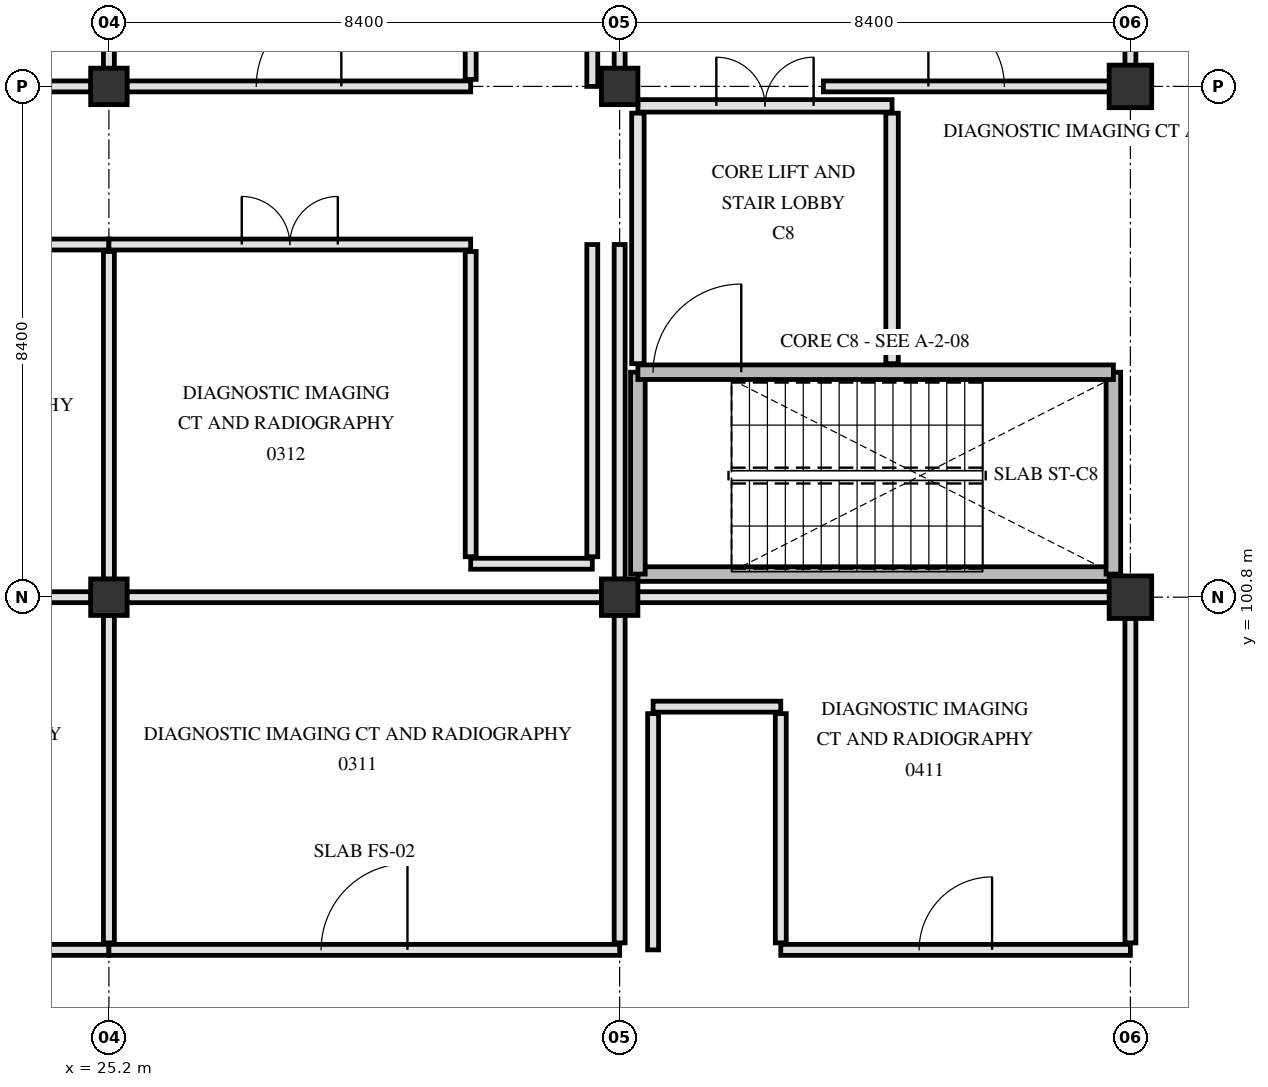
"""IFC4 building model, lengths in metres.
Left out: names, types, materials, properties, quantities, classifications, styles, units other than length and angle.
Written with IfcOpenShell. Run it as: python <this file> out.ifc"""

import sys

from ifc_helpers import new_model, si_unit, direction, frame, frame_2d, origin, origin_2d, place, context, subcontext, project, spatial, rectangle, extrude, element, fill, save


model = new_model("IFC4")
c1 = context("Model", 3, precision=1e-05, world=origin(), true_north=direction((0.0, 1.0)))
c2 = subcontext(c1, "Body", "Model", "MODEL_VIEW")
j1 = project(units=[si_unit("LENGTHUNIT", "METRE"), si_unit("PLANEANGLEUNIT", "RADIAN")], contexts=[c1])
p1 = place(None, origin())
s1 = spatial("IfcSite", under=j1, at=p1, CompositionType="ELEMENT")
p2 = place(p1, origin())
s2 = spatial("IfcBuilding", under=s1, at=p2, CompositionType="ELEMENT")
p3 = place(p2, origin())
s3 = spatial("IfcBuildingStorey", under=s2, at=p3, CompositionType="ELEMENT", Elevation=0.0)
for number, where, z_axis, x_axis in (
    (1, (25.2, 100.8, 0.0), (0.0, 0.0, 1.0), (1.0, 0.0, 0.0)),
    (2, (25.2, 109.2, 0.0), (0.0, 0.0, 1.0), (1.0, 0.0, 0.0)),
    (3, (33.6, 100.8, 0.0), (0.0, 0.0, 1.0), (1.0, 0.0, 0.0)),
    (4, (33.6, 109.2, 0.0), (0.0, 0.0, 1.0), (1.0, 0.0, 0.0)),
):
    element("IfcColumn", number, at=place(p3, frame(where, z_axis=z_axis, x_axis=x_axis)), inside=s3, PredefinedType="COLUMN", context=c2, shape_type="SweptSolid", body=[
        extrude(rectangle(XDim=0.6, YDim=0.6, at=origin_2d()), origin(), (0.0, 0.0, 1.0), 4.8),
    ])
for number, where, z_axis, x_axis in (
    (5, (42.0, 100.8, 0.0), (0.0, 0.0, 1.0), (1.0, 0.0, 0.0)),
    (6, (42.0, 109.2, 0.0), (0.0, 0.0, 1.0), (1.0, 0.0, 0.0)),
):
    element("IfcColumn", number, at=place(p3, frame(where, z_axis=z_axis, x_axis=x_axis)), inside=s3, PredefinedType="COLUMN", context=c2, shape_type="SweptSolid", body=[
        extrude(rectangle(XDim=0.7, YDim=0.7, at=origin_2d()), origin(), (0.0, 0.0, 1.0), 4.8),
    ])
p4 = place(p3, frame((33.9, 101.18, 0.0), z_axis=(0.0, 0.0, 1.0), x_axis=(1.0, 0.0, 0.0)))
e7 = element("IfcWall", 7, at=p4, inside=s3, PredefinedType="SHEAR", context=c2, shape_type="SweptSolid", body=[
    extrude(rectangle(XDim=7.82, YDim=0.24, at=frame_2d((3.91, 0.0))), origin(), (0.0, 0.0, 1.0), 4.5),
])
for number, where, z_axis, x_axis in (
    (8, (33.9, 101.18, 0.0), (0.0, 0.0, 1.0), (0.0, 1.0, 0.0)),
    (9, (41.72, 101.18, 0.0), (0.0, 0.0, 1.0), (0.0, 1.0, 0.0)),
):
    element("IfcWall", number, at=place(p3, frame(where, z_axis=z_axis, x_axis=x_axis)), inside=s3, PredefinedType="SHEAR", context=c2, shape_type="SweptSolid", body=[
        extrude(rectangle(XDim=3.32, YDim=0.24, at=frame_2d((1.66, 0.0))), origin(), (0.0, 0.0, 1.0), 4.5),
    ])
p5 = place(p3, frame((33.9, 104.5, 0.0), z_axis=(0.0, 0.0, 1.0), x_axis=(1.0, 0.0, 0.0)))
e10 = element("IfcWall", 10, at=p5, inside=s3, PredefinedType="SHEAR", context=c2, shape_type="SweptSolid", body=[
    extrude(rectangle(XDim=7.82, YDim=0.24, at=frame_2d((3.91, 0.0))), origin(), (0.0, 0.0, 1.0), 4.5),
])
p6 = place(p5, frame((0.25, 0.0, 0.0)))
e11 = element("IfcOpeningElement", 11, at=p6, cuts=e10, PredefinedType="OPENING", context=c2, shape_type="SweptSolid", body=[
    extrude(rectangle(XDim=1.45, YDim=2.2, at=frame_2d((0.725, 1.1))), frame((0.0, 0.13, 0.0), z_axis=(0.0, -1.0, 0.0), x_axis=(1.0, 0.0, 0.0)), (0.0, 0.0, 1.0), 0.26),
])
p7 = place(p3, frame((38.08, 104.64, 0.0), z_axis=(0.0, 0.0, 1.0), x_axis=(0.0, 1.0, 0.0)))
e12 = element("IfcWall", 12, at=p7, inside=s3, PredefinedType="PARTITIONING", context=c2, shape_type="SweptSolid", body=[
    extrude(rectangle(XDim=4.12, YDim=0.205, at=frame_2d((2.06, 0.0))), origin(), (0.0, 0.0, 1.0), 4.49),
])
p8 = place(p3, frame((33.9, 104.64, 0.0), z_axis=(0.0, 0.0, 1.0), x_axis=(0.0, 1.0, 0.0)))
e13 = element("IfcWall", 13, at=p8, inside=s3, PredefinedType="PARTITIONING", context=c2, shape_type="SweptSolid", body=[
    extrude(rectangle(XDim=4.12, YDim=0.205, at=frame_2d((2.06, 0.0))), origin(), (0.0, 0.0, 1.0), 3.89),
])
p9 = place(p3, frame((33.9, 108.88, 0.0), z_axis=(0.0, 0.0, 1.0), x_axis=(1.0, 0.0, 0.0)))
e14 = element("IfcWall", 14, at=p9, inside=s3, PredefinedType="PARTITIONING", context=c2, shape_type="SweptSolid", body=[
    extrude(rectangle(XDim=4.18, YDim=0.205, at=frame_2d((2.09, 0.0))), origin(), (0.0, 0.0, 1.0), 3.84),
])
p10 = place(p9, frame((1.29, 0.0, 0.0)))
e15 = element("IfcOpeningElement", 15, at=p10, cuts=e14, PredefinedType="OPENING", context=c2, shape_type="SweptSolid", body=[
    extrude(rectangle(XDim=1.6, YDim=2.25, at=frame_2d((0.8, 1.125))), frame((0.0, 0.113, 0.0), z_axis=(0.0, -1.0, 0.0), x_axis=(1.0, 0.0, 0.0)), (0.0, 0.0, 1.0), 0.225),
])
p11 = place(p3, frame((16.8, 95.0, 0.0), z_axis=(0.0, 0.0, 1.0), x_axis=(1.0, 0.0, 0.0)))
e16 = element("IfcWall", 16, at=p11, inside=s3, PredefinedType="PARTITIONING", context=c2, shape_type="SweptSolid", body=[
    extrude(rectangle(XDim=8.4, YDim=0.18, at=frame_2d((4.2, 0.0))), origin(), (0.0, 0.0, 1.0), 3.89),
])
p12 = place(p11, frame((3.38, 0.0, 0.0)))
e17 = element("IfcOpeningElement", 17, at=p12, cuts=e16, PredefinedType="OPENING", context=c2, shape_type="SweptSolid", body=[
    extrude(rectangle(XDim=1.64, YDim=2.28, at=frame_2d((0.82, 1.14))), frame((0.0, 0.1, 0.0), z_axis=(0.0, -1.0, 0.0), x_axis=(1.0, 0.0, 0.0)), (0.0, 0.0, 1.0), 0.2),
])
p13 = place(p3, frame((25.2, 95.0, 0.0), z_axis=(0.0, 0.0, 1.0), x_axis=(1.0, 0.0, 0.0)))
e18 = element("IfcWall", 18, at=p13, inside=s3, PredefinedType="PARTITIONING", context=c2, shape_type="SweptSolid", body=[
    extrude(rectangle(XDim=8.4, YDim=0.18, at=frame_2d((4.2, 0.0))), origin(), (0.0, 0.0, 1.0), 3.89),
])
p14 = place(p13, frame((3.49, 0.0, 0.0)))
e19 = element("IfcOpeningElement", 19, at=p14, cuts=e18, PredefinedType="OPENING", context=c2, shape_type="SweptSolid", body=[
    extrude(rectangle(XDim=1.42, YDim=2.22, at=frame_2d((0.71, 1.11))), frame((0.0, 0.1, 0.0), z_axis=(0.0, -1.0, 0.0), x_axis=(1.0, 0.0, 0.0)), (0.0, 0.0, 1.0), 0.2),
])
p15 = place(p3, frame((36.25, 95.0, 0.0), z_axis=(0.0, 0.0, 1.0), x_axis=(1.0, 0.0, 0.0)))
e20 = element("IfcWall", 20, at=p15, inside=s3, PredefinedType="PARTITIONING", context=c2, shape_type="SweptSolid", body=[
    extrude(rectangle(XDim=5.75, YDim=0.18, at=frame_2d((2.875, 0.0))), origin(), (0.0, 0.0, 1.0), 3.89),
])
p16 = place(p15, frame((2.275, 0.0, 0.0)))
e21 = element("IfcOpeningElement", 21, at=p16, cuts=e20, PredefinedType="OPENING", context=c2, shape_type="SweptSolid", body=[
    extrude(rectangle(XDim=1.2, YDim=2.15, at=frame_2d((0.6, 1.075))), frame((0.0, 0.1, 0.0), z_axis=(0.0, -1.0, 0.0), x_axis=(1.0, 0.0, 0.0)), (0.0, 0.0, 1.0), 0.2),
])
p17 = place(p3, frame((34.15, 99.0, 0.0), z_axis=(0.0, 0.0, 1.0), x_axis=(1.0, 0.0, 0.0)))
e22 = element("IfcWall", 22, at=p17, inside=s3, PredefinedType="PARTITIONING", context=c2, shape_type="SweptSolid", body=[
    extrude(rectangle(XDim=2.1, YDim=0.18, at=frame_2d((1.05, 0.0))), origin(), (0.0, 0.0, 1.0), 4.49),
])
p18 = place(p3, frame((17.095, 100.8, 0.0), z_axis=(0.0, 0.0, 1.0), x_axis=(1.0, 0.0, 0.0)))
e23 = element("IfcWall", 23, at=p18, inside=s3, PredefinedType="PARTITIONING", context=c2, shape_type="SweptSolid", body=[
    extrude(rectangle(XDim=7.81, YDim=0.18, at=frame_2d((3.905, 0.0))), origin(), (0.0, 0.0, 1.0), 3.84),
])
p19 = place(p3, frame((25.495, 100.8, 0.0), z_axis=(0.0, 0.0, 1.0), x_axis=(1.0, 0.0, 0.0)))
e24 = element("IfcWall", 24, at=p19, inside=s3, PredefinedType="PARTITIONING", context=c2, shape_type="SweptSolid", body=[
    extrude(rectangle(XDim=7.81, YDim=0.18, at=frame_2d((3.905, 0.0))), origin(), (0.0, 0.0, 1.0), 3.84),
])
p20 = place(p3, frame((33.895, 100.8, 0.0), z_axis=(0.0, 0.0, 1.0), x_axis=(1.0, 0.0, 0.0)))
e25 = element("IfcWall", 25, at=p20, inside=s3, PredefinedType="PARTITIONING", context=c2, shape_type="SweptSolid", body=[
    extrude(rectangle(XDim=7.76, YDim=0.18, at=frame_2d((3.88, 0.0))), origin(), (0.0, 0.0, 1.0), 3.84),
])
p21 = place(p3, frame((31.15, 101.35, 0.0), z_axis=(0.0, 0.0, 1.0), x_axis=(1.0, 0.0, 0.0)))
e26 = element("IfcWall", 26, at=p21, inside=s3, PredefinedType="PARTITIONING", context=c2, shape_type="SweptSolid", body=[
    extrude(rectangle(XDim=2.0, YDim=0.18, at=frame_2d((1.0, 0.0))), origin(), (0.0, 0.0, 1.0), 4.49),
])
p22 = place(p3, frame((16.8, 106.6, 0.0), z_axis=(0.0, 0.0, 1.0), x_axis=(1.0, 0.0, 0.0)))
e27 = element("IfcWall", 27, at=p22, inside=s3, PredefinedType="PARTITIONING", context=c2, shape_type="SweptSolid", body=[
    extrude(rectangle(XDim=8.4, YDim=0.18, at=frame_2d((4.2, 0.0))), origin(), (0.0, 0.0, 1.0), 3.89),
])
p23 = place(p22, frame((3.33, 0.0, 0.0)))
e28 = element("IfcOpeningElement", 28, at=p23, cuts=e27, PredefinedType="OPENING", context=c2, shape_type="SweptSolid", body=[
    extrude(rectangle(XDim=1.74, YDim=2.24, at=frame_2d((0.87, 1.12))), frame((0.0, 0.1, 0.0), z_axis=(0.0, -1.0, 0.0), x_axis=(1.0, 0.0, 0.0)), (0.0, 0.0, 1.0), 0.2),
])
p24 = place(p3, frame((25.2, 106.6, 0.0), z_axis=(0.0, 0.0, 1.0), x_axis=(1.0, 0.0, 0.0)))
e29 = element("IfcWall", 29, at=p24, inside=s3, PredefinedType="PARTITIONING", context=c2, shape_type="SweptSolid", body=[
    extrude(rectangle(XDim=5.95, YDim=0.18, at=frame_2d((2.975, 0.0))), origin(), (0.0, 0.0, 1.0), 3.89),
])
p25 = place(p24, frame((2.185, 0.0, 0.0)))
e30 = element("IfcOpeningElement", 30, at=p25, cuts=e29, PredefinedType="OPENING", context=c2, shape_type="SweptSolid", body=[
    extrude(rectangle(XDim=1.58, YDim=2.22, at=frame_2d((0.79, 1.11))), frame((0.0, 0.1, 0.0), z_axis=(0.0, -1.0, 0.0), x_axis=(1.0, 0.0, 0.0)), (0.0, 0.0, 1.0), 0.2),
])
p26 = place(p3, frame((17.095, 109.2, 0.0), z_axis=(0.0, 0.0, 1.0), x_axis=(1.0, 0.0, 0.0)))
e31 = element("IfcWall", 31, at=p26, inside=s3, PredefinedType="PARTITIONING", context=c2, shape_type="SweptSolid", body=[
    extrude(rectangle(XDim=7.81, YDim=0.18, at=frame_2d((3.905, 0.0))), origin(), (0.0, 0.0, 1.0), 3.84),
])
p27 = place(p26, frame((2.985, 0.0, 0.0)))
e32 = element("IfcOpeningElement", 32, at=p27, cuts=e31, PredefinedType="OPENING", context=c2, shape_type="SweptSolid", body=[
    extrude(rectangle(XDim=1.84, YDim=2.28, at=frame_2d((0.92, 1.14))), frame((0.0, 0.1, 0.0), z_axis=(0.0, -1.0, 0.0), x_axis=(1.0, 0.0, 0.0)), (0.0, 0.0, 1.0), 0.2),
])
p28 = place(p3, frame((25.495, 109.2, 0.0), z_axis=(0.0, 0.0, 1.0), x_axis=(1.0, 0.0, 0.0)))
e33 = element("IfcWall", 33, at=p28, inside=s3, PredefinedType="PARTITIONING", context=c2, shape_type="SweptSolid", body=[
    extrude(rectangle(XDim=5.655, YDim=0.18, at=frame_2d((2.827, 0.0))), origin(), (0.0, 0.0, 1.0), 3.84),
])
p29 = place(p28, frame((2.127, 0.0, 0.0)))
e34 = element("IfcOpeningElement", 34, at=p29, cuts=e33, PredefinedType="OPENING", context=c2, shape_type="SweptSolid", body=[
    extrude(rectangle(XDim=1.4, YDim=2.2, at=frame_2d((0.7, 1.1))), frame((0.0, 0.1, 0.0), z_axis=(0.0, -1.0, 0.0), x_axis=(1.0, 0.0, 0.0)), (0.0, 0.0, 1.0), 0.2),
])
p30 = place(p3, frame((36.95, 109.2, 0.0), z_axis=(0.0, 0.0, 1.0), x_axis=(1.0, 0.0, 0.0)))
e35 = element("IfcWall", 35, at=p30, inside=s3, PredefinedType="PARTITIONING", context=c2, shape_type="SweptSolid", body=[
    extrude(rectangle(XDim=4.705, YDim=0.18, at=frame_2d((2.353, 0.0))), origin(), (0.0, 0.0, 1.0), 3.84),
])
p31 = place(p30, frame((1.728, 0.0, 0.0)))
e36 = element("IfcOpeningElement", 36, at=p31, cuts=e35, PredefinedType="OPENING", context=c2, shape_type="SweptSolid", body=[
    extrude(rectangle(XDim=1.25, YDim=2.2, at=frame_2d((0.625, 1.1))), frame((0.0, 0.1, 0.0), z_axis=(0.0, -1.0, 0.0), x_axis=(1.0, 0.0, 0.0)), (0.0, 0.0, 1.0), 0.2),
])
p32 = place(p3, frame((25.2, 95.115, 0.0), z_axis=(0.0, 0.0, 1.0), x_axis=(0.0, 1.0, 0.0)))
e37 = element("IfcWall", 37, at=p32, inside=s3, PredefinedType="PARTITIONING", context=c2, shape_type="SweptSolid", body=[
    extrude(rectangle(XDim=5.39, YDim=0.18, at=frame_2d((2.695, 0.0))), origin(), (0.0, 0.0, 1.0), 3.89),
])
p33 = place(p3, frame((25.2, 101.095, 0.0), z_axis=(0.0, 0.0, 1.0), x_axis=(0.0, 1.0, 0.0)))
e38 = element("IfcWall", 38, at=p33, inside=s3, PredefinedType="PARTITIONING", context=c2, shape_type="SweptSolid", body=[
    extrude(rectangle(XDim=5.39, YDim=0.18, at=frame_2d((2.695, 0.0))), origin(), (0.0, 0.0, 1.0), 3.89),
])
p34 = place(p3, frame((25.2, 109.495, 0.0), z_axis=(0.0, 0.0, 1.0), x_axis=(0.0, 1.0, 0.0)))
e39 = element("IfcWall", 39, at=p34, inside=s3, PredefinedType="PARTITIONING", context=c2, shape_type="SweptSolid", body=[
    extrude(rectangle(XDim=7.81, YDim=0.18, at=frame_2d((3.905, 0.0))), origin(), (0.0, 0.0, 1.0), 3.89),
])
p35 = place(p3, frame((31.15, 101.465, 0.0), z_axis=(0.0, 0.0, 1.0), x_axis=(0.0, 1.0, 0.0)))
e40 = element("IfcWall", 40, at=p35, inside=s3, PredefinedType="PARTITIONING", context=c2, shape_type="SweptSolid", body=[
    extrude(rectangle(XDim=5.02, YDim=0.18, at=frame_2d((2.51, 0.0))), origin(), (0.0, 0.0, 1.0), 4.49),
])
p36 = place(p3, frame((31.15, 109.315, 0.0), z_axis=(0.0, 0.0, 1.0), x_axis=(0.0, 1.0, 0.0)))
e41 = element("IfcWall", 41, at=p36, inside=s3, PredefinedType="PARTITIONING", context=c2, shape_type="SweptSolid", body=[
    extrude(rectangle(XDim=2.22, YDim=0.18, at=frame_2d((1.11, 0.0))), origin(), (0.0, 0.0, 1.0), 3.84),
])
p37 = place(p3, frame((33.15, 101.465, 0.0), z_axis=(0.0, 0.0, 1.0), x_axis=(0.0, 1.0, 0.0)))
e42 = element("IfcWall", 42, at=p37, inside=s3, PredefinedType="PARTITIONING", context=c2, shape_type="SweptSolid", body=[
    extrude(rectangle(XDim=5.135, YDim=0.18, at=frame_2d((2.567, 0.0))), origin(), (0.0, 0.0, 1.0), 4.49),
])
p38 = place(p3, frame((33.15, 109.2, 0.0), z_axis=(0.0, 0.0, 1.0), x_axis=(0.0, 1.0, 0.0)))
e43 = element("IfcWall", 43, at=p38, inside=s3, PredefinedType="PARTITIONING", context=c2, shape_type="SweptSolid", body=[
    extrude(rectangle(XDim=2.335, YDim=0.18, at=frame_2d((1.167, 0.0))), origin(), (0.0, 0.0, 1.0), 3.84),
])
p39 = place(p3, frame((33.6, 95.115, 0.0), z_axis=(0.0, 0.0, 1.0), x_axis=(0.0, 1.0, 0.0)))
e44 = element("IfcWall", 44, at=p39, inside=s3, PredefinedType="PARTITIONING", context=c2, shape_type="SweptSolid", body=[
    extrude(rectangle(XDim=5.39, YDim=0.18, at=frame_2d((2.695, 0.0))), origin(), (0.0, 0.0, 1.0), 3.89),
])
p40 = place(p3, frame((33.6, 101.095, 0.0), z_axis=(0.0, 0.0, 1.0), x_axis=(0.0, 1.0, 0.0)))
e45 = element("IfcWall", 45, at=p40, inside=s3, PredefinedType="PARTITIONING", context=c2, shape_type="SweptSolid", body=[
    extrude(rectangle(XDim=5.505, YDim=0.18, at=frame_2d((2.752, 0.0))), origin(), (0.0, 0.0, 1.0), 3.89),
])
p41 = place(p3, frame((33.6, 109.495, 0.0), z_axis=(0.0, 0.0, 1.0), x_axis=(0.0, 1.0, 0.0)))
e46 = element("IfcWall", 46, at=p41, inside=s3, PredefinedType="PARTITIONING", context=c2, shape_type="SweptSolid", body=[
    extrude(rectangle(XDim=7.66, YDim=0.18, at=frame_2d((3.83, 0.0))), origin(), (0.0, 0.0, 1.0), 3.89),
])
p42 = place(p3, frame((34.15, 95.0, 0.0), z_axis=(0.0, 0.0, 1.0), x_axis=(0.0, 1.0, 0.0)))
e47 = element("IfcWall", 47, at=p42, inside=s3, PredefinedType="PARTITIONING", context=c2, shape_type="SweptSolid", body=[
    extrude(rectangle(XDim=3.885, YDim=0.18, at=frame_2d((1.942, 0.0))), origin(), (0.0, 0.0, 1.0), 4.49),
])
p43 = place(p3, frame((36.25, 95.115, 0.0), z_axis=(0.0, 0.0, 1.0), x_axis=(0.0, 1.0, 0.0)))
e48 = element("IfcWall", 48, at=p43, inside=s3, PredefinedType="PARTITIONING", context=c2, shape_type="SweptSolid", body=[
    extrude(rectangle(XDim=3.77, YDim=0.18, at=frame_2d((1.885, 0.0))), origin(), (0.0, 0.0, 1.0), 4.49),
])
p44 = place(p3, frame((42.0, 95.115, 0.0), z_axis=(0.0, 0.0, 1.0), x_axis=(0.0, 1.0, 0.0)))
e49 = element("IfcWall", 49, at=p44, inside=s3, PredefinedType="PARTITIONING", context=c2, shape_type="SweptSolid", body=[
    extrude(rectangle(XDim=5.34, YDim=0.18, at=frame_2d((2.67, 0.0))), origin(), (0.0, 0.0, 1.0), 3.89),
])
p45 = place(p3, frame((42.0, 109.545, 0.0), z_axis=(0.0, 0.0, 1.0), x_axis=(0.0, 1.0, 0.0)))
e50 = element("IfcWall", 50, at=p45, inside=s3, PredefinedType="PARTITIONING", context=c2, shape_type="SweptSolid", body=[
    extrude(rectangle(XDim=7.71, YDim=0.18, at=frame_2d((3.855, 0.0))), origin(), (0.0, 0.0, 1.0), 3.89),
])
p46 = place(p6, origin())
e51 = element("IfcDoor", 51, at=p46, inside=s3, OperationType="SINGLE_SWING_RIGHT", PredefinedType="DOOR", context=c2, shape_type="SweptSolid", body=[
    extrude(rectangle(XDim=1.45, YDim=2.2, at=frame_2d((0.725, 1.1))), frame((0.0, 0.025, 0.0), z_axis=(0.0, -1.0, 0.0), x_axis=(1.0, 0.0, 0.0)), (0.0, 0.0, 1.0), 0.05),
])
fill(e11, e51)
p47 = place(p10, origin())
e52 = element("IfcDoor", 52, at=p47, inside=s3, OperationType="DOUBLE_SWING_LEFT", PredefinedType="DOOR", context=c2, shape_type="SweptSolid", body=[
    extrude(rectangle(XDim=1.6, YDim=2.25, at=frame_2d((0.8, 1.125))), frame((0.0, 0.025, 0.0), z_axis=(0.0, -1.0, 0.0), x_axis=(1.0, 0.0, 0.0)), (0.0, 0.0, 1.0), 0.05),
])
fill(e15, e52)
p48 = place(p14, origin())
e53 = element("IfcDoor", 53, at=p48, inside=s3, OperationType="SINGLE_SWING_RIGHT", PredefinedType="DOOR", context=c2, shape_type="SweptSolid", body=[
    extrude(rectangle(XDim=1.42, YDim=2.22, at=frame_2d((0.71, 1.11))), frame((0.0, 0.025, 0.0), z_axis=(0.0, -1.0, 0.0), x_axis=(1.0, 0.0, 0.0)), (0.0, 0.0, 1.0), 0.05),
])
fill(e19, e53)
p49 = place(p25, origin())
e54 = element("IfcDoor", 54, at=p49, inside=s3, OperationType="DOUBLE_SWING_LEFT", PredefinedType="DOOR", context=c2, shape_type="SweptSolid", body=[
    extrude(rectangle(XDim=1.58, YDim=2.22, at=frame_2d((0.79, 1.11))), frame((0.0, 0.025, 0.0), z_axis=(0.0, -1.0, 0.0), x_axis=(1.0, 0.0, 0.0)), (0.0, 0.0, 1.0), 0.05),
])
fill(e30, e54)
p50 = place(p29, origin())
e55 = element("IfcDoor", 55, at=p50, inside=s3, OperationType="SINGLE_SWING_RIGHT", PredefinedType="DOOR", context=c2, shape_type="SweptSolid", body=[
    extrude(rectangle(XDim=1.4, YDim=2.2, at=frame_2d((0.7, 1.1))), frame((0.0, 0.025, 0.0), z_axis=(0.0, -1.0, 0.0), x_axis=(1.0, 0.0, 0.0)), (0.0, 0.0, 1.0), 0.05),
])
fill(e34, e55)
p51 = place(p16, origin())
e56 = element("IfcDoor", 56, at=p51, inside=s3, OperationType="SINGLE_SWING_RIGHT", PredefinedType="DOOR", context=c2, shape_type="SweptSolid", body=[
    extrude(rectangle(XDim=1.2, YDim=2.15, at=frame_2d((0.6, 1.075))), frame((0.0, 0.025, 0.0), z_axis=(0.0, -1.0, 0.0), x_axis=(1.0, 0.0, 0.0)), (0.0, 0.0, 1.0), 0.05),
])
fill(e21, e56)
p52 = place(p31, origin())
e57 = element("IfcDoor", 57, at=p52, inside=s3, OperationType="SINGLE_SWING_LEFT", PredefinedType="DOOR", context=c2, shape_type="SweptSolid", body=[
    extrude(rectangle(XDim=1.25, YDim=2.2, at=frame_2d((0.625, 1.1))), frame((0.0, 0.025, 0.0), z_axis=(0.0, -1.0, 0.0), x_axis=(1.0, 0.0, 0.0)), (0.0, 0.0, 1.0), 0.05),
])
fill(e36, e57)
save(model, sys.argv[1])
